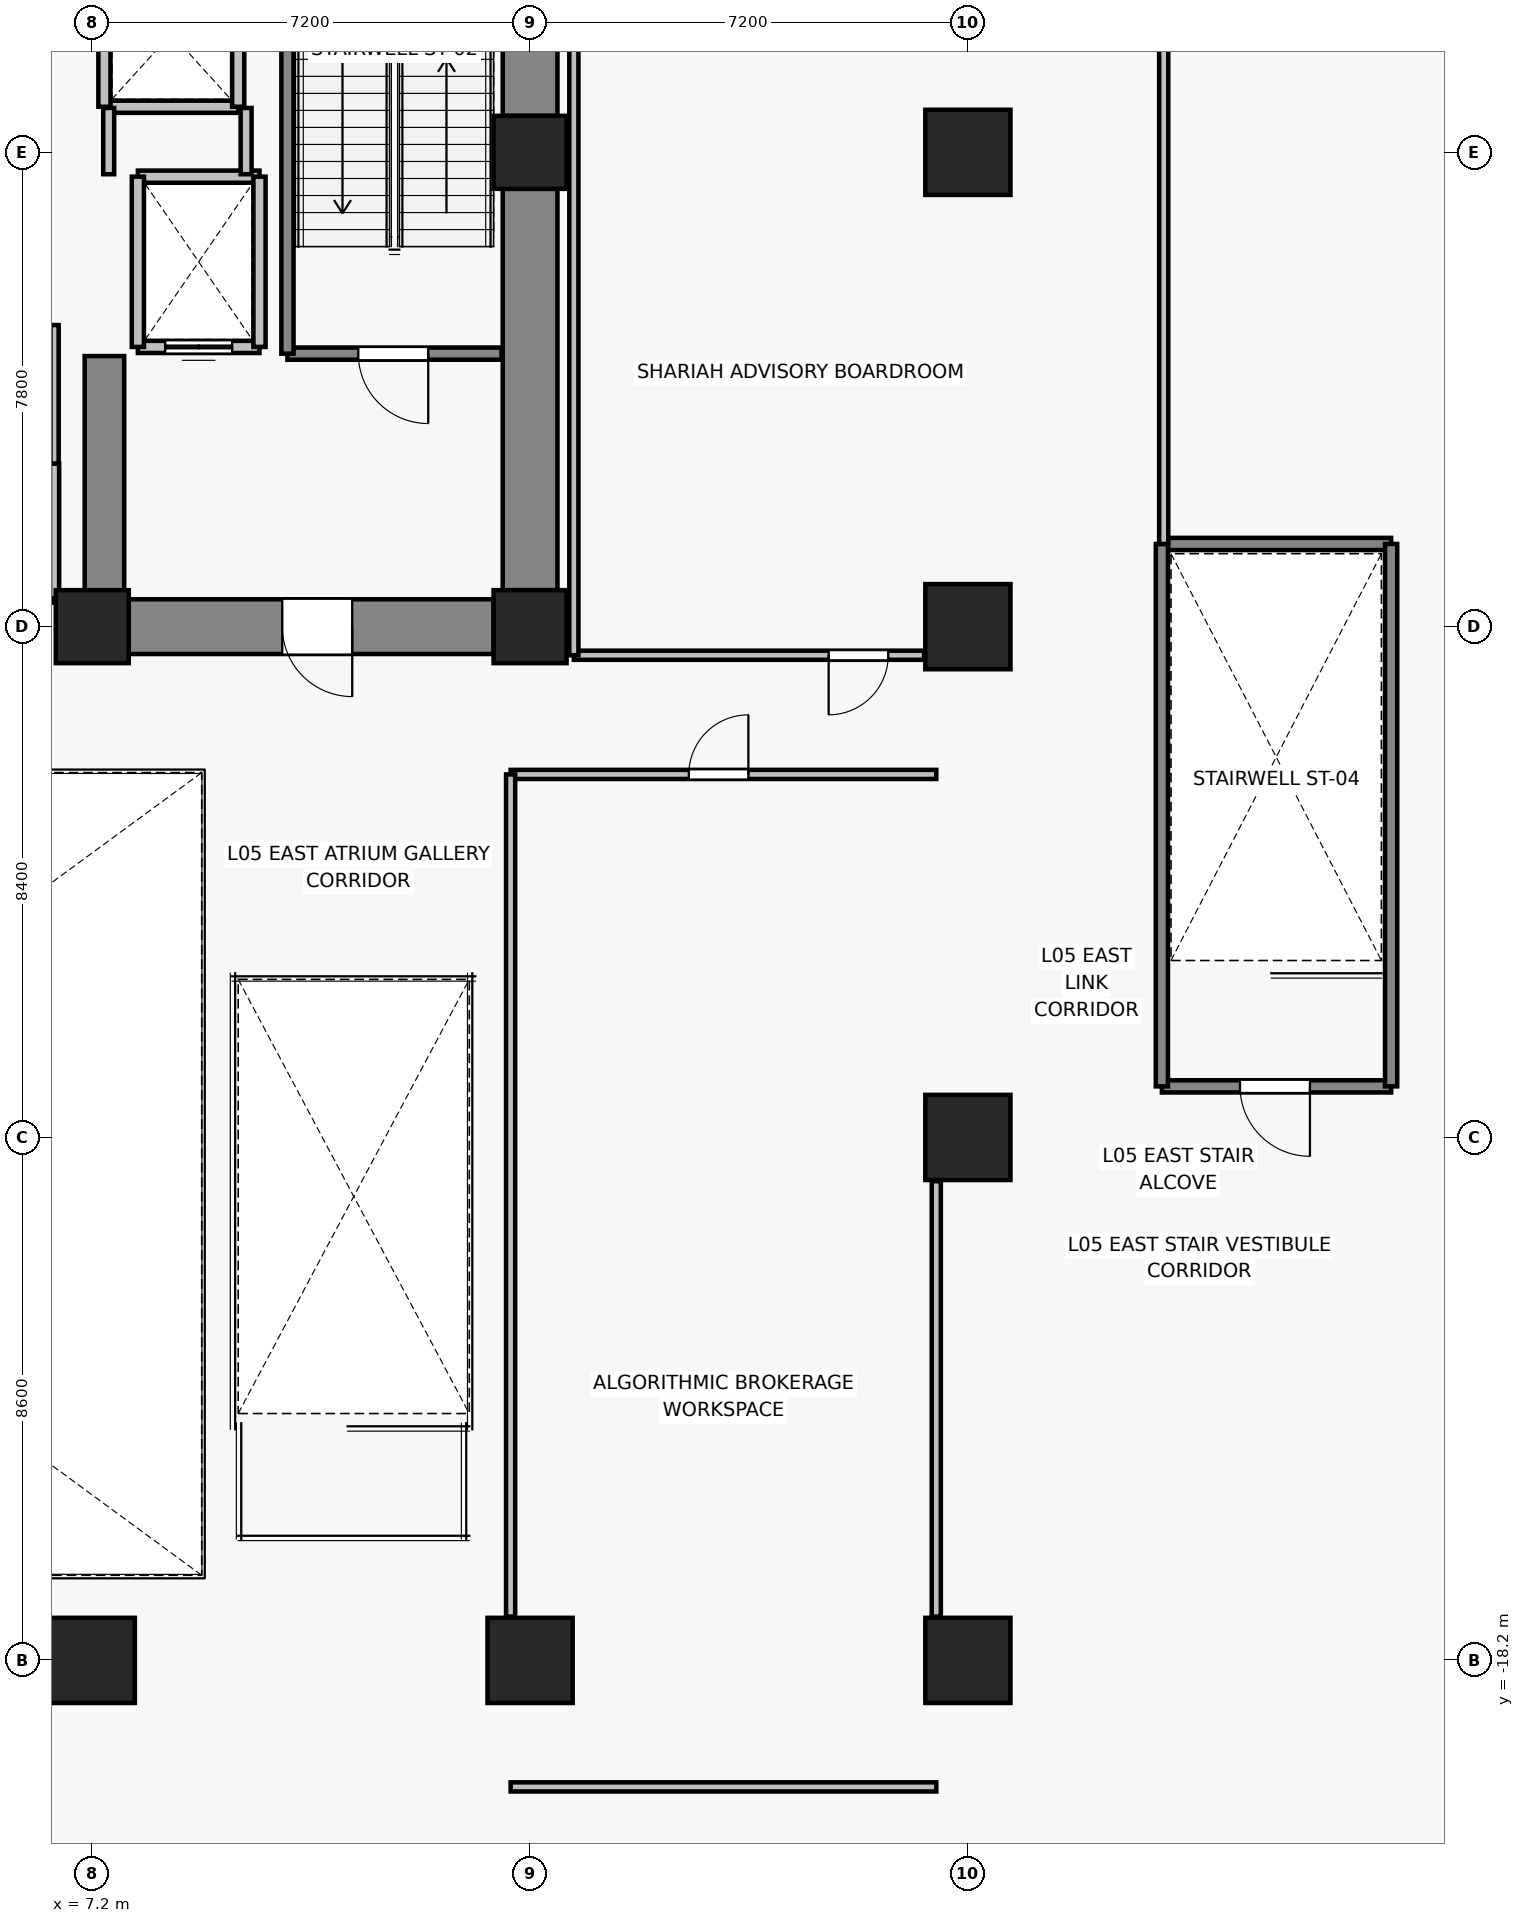
"""IFC4 building model, lengths in metres.
Left out: names, types, materials, properties, quantities, classifications, styles, units other than length and angle.
Written with IfcOpenShell. Run it as: python <this file> out.ifc"""

import sys

from ifc_helpers import new_model, si_unit, direction, frame, frame_2d, origin, origin_2d, place, context, subcontext, project, spatial, rectangle, extrude, source, transform, mapped, element, fill, save


model = new_model("IFC4")
c1 = context("Model", 3, precision=1e-05, world=origin(), true_north=direction((0.0, 1.0)))
c2 = subcontext(c1, "Body", "Model", "MODEL_VIEW")
j1 = project(units=[si_unit("LENGTHUNIT", "METRE"), si_unit("PLANEANGLEUNIT", "RADIAN")], contexts=[c1])
p1 = place(None, origin())
s1 = spatial("IfcSite", under=j1, at=p1, CompositionType="ELEMENT")
p2 = place(p1, origin())
s2 = spatial("IfcBuilding", under=s1, at=p2, CompositionType="ELEMENT")
p3 = place(p2, frame((0.0, 0.0, 22.6)))
s3 = spatial("IfcBuildingStorey", under=s2, at=p3, CompositionType="ELEMENT", Elevation=22.6)
for number, where, z_axis, x_axis in (
    (1, (7.2, -1.2, 0.0), (0.0, 0.0, 1.0), (1.0, 0.0, 0.0)),
    (2, (14.4, -1.2, 0.0), (0.0, 0.0, 1.0), (1.0, 0.0, 0.0)),
    (3, (14.4, 6.6, 0.0), (0.0, 0.0, 1.0), (1.0, 0.0, 0.0)),
):
    element("IfcColumn", number, at=place(p3, frame(where, z_axis=z_axis, x_axis=x_axis)), inside=s3, PredefinedType="COLUMN", context=c2, shape_type="SweptSolid", body=[
        extrude(rectangle(XDim=1.2, YDim=1.2, at=origin_2d()), origin(), (0.0, 0.0, 1.0), 4.8),
    ])
for number, where, z_axis, x_axis in (
    (4, (7.2, -18.2, 0.0), (0.0, 0.0, 1.0), (1.0, 0.0, 0.0)),
    (5, (14.4, -18.2, 0.0), (0.0, 0.0, 1.0), (1.0, 0.0, 0.0)),
    (6, (21.6, -18.2, 0.0), (0.0, 0.0, 1.0), (1.0, 0.0, 0.0)),
    (7, (21.6, -9.6, 0.0), (0.0, 0.0, 1.0), (1.0, 0.0, 0.0)),
    (8, (21.6, -1.2, 0.0), (0.0, 0.0, 1.0), (1.0, 0.0, 0.0)),
    (9, (21.6, 6.6, 0.0), (0.0, 0.0, 1.0), (1.0, 0.0, 0.0)),
):
    element("IfcColumn", number, at=place(p3, frame(where, z_axis=z_axis, x_axis=x_axis)), inside=s3, PredefinedType="COLUMN", context=c2, shape_type="SweptSolid", body=[
        extrude(rectangle(XDim=1.4, YDim=1.4, at=origin_2d()), origin(), (0.0, 0.0, 1.0), 4.8),
    ])
p4 = place(p3, frame((14.4, -0.6, 0.0), z_axis=(0.0, 0.0, 1.0), x_axis=(0.0, 1.0, 0.0)))
e10 = element("IfcWall", 10, at=p4, inside=s3, PredefinedType="SHEAR", context=c2, shape_type="SweptSolid", body=[
    extrude(rectangle(XDim=6.6, YDim=0.9, at=frame_2d((3.3, 0.0))), origin(), (0.0, 0.0, 1.0), 4.55),
])
p5 = place(p3, frame((14.4, 7.2, 0.0), z_axis=(0.0, 0.0, 1.0), x_axis=(0.0, 1.0, 0.0)))
e11 = element("IfcWall", 11, at=p5, inside=s3, PredefinedType="SHEAR", context=c2, shape_type="SweptSolid", body=[
    extrude(rectangle(XDim=5.7, YDim=0.9, at=frame_2d((2.85, 0.0))), origin(), (0.0, 0.0, 1.0), 4.55),
])
p6 = place(p3, frame((13.8, -1.2, 0.0), z_axis=(0.0, 0.0, 1.0), x_axis=(-1.0, 0.0, 0.0)))
e12 = element("IfcWall", 12, at=p6, inside=s3, PredefinedType="SHEAR", context=c2, shape_type="SweptSolid", body=[
    extrude(rectangle(XDim=6.0, YDim=0.9, at=frame_2d((3.0, 0.0))), origin(), (0.0, 0.0, 1.0), 4.55),
])
p7 = place(p6, frame((2.325, 0.0, 0.0)))
e13 = element("IfcOpeningElement", 13, at=p7, cuts=e12, PredefinedType="OPENING", context=c2, shape_type="SweptSolid", body=[
    extrude(rectangle(XDim=1.15, YDim=2.15, at=frame_2d((0.575, 1.075))), frame((0.0, 0.46, 0.0), z_axis=(0.0, -1.0, 0.0), x_axis=(1.0, 0.0, 0.0)), (0.0, 0.0, 1.0), 0.92),
])
p8 = place(p3, frame((7.4, -0.75, 0.0), z_axis=(0.0, 0.0, 1.0), x_axis=(0.0, 1.0, 0.0)))
e14 = element("IfcWall", 14, at=p8, inside=s3, PredefinedType="SHEAR", context=c2, shape_type="SweptSolid", body=[
    extrude(rectangle(XDim=4.0, YDim=0.65, at=frame_2d((2.0, 0.0))), origin(), (0.0, 0.0, 1.0), 4.55),
])
p9 = place(p3, frame((9.95, 3.4, 0.0), z_axis=(0.0, 0.0, 1.0), x_axis=(-1.0, 0.0, 0.0)))
e15 = element("IfcWall", 15, at=p9, inside=s3, PredefinedType="SOLIDWALL", context=c2, shape_type="SweptSolid", body=[
    extrude(rectangle(XDim=2.0, YDim=0.2, at=frame_2d((1.0, 0.0))), origin(), (0.0, 0.0, 1.0), 4.55),
])
p10 = place(p9, frame((0.45, 0.0, 0.0)))
e16 = element("IfcOpeningElement", 16, at=p10, cuts=e15, PredefinedType="OPENING", context=c2, shape_type="SweptSolid", body=[
    extrude(rectangle(XDim=1.1, YDim=2.2, at=frame_2d((0.55, 1.1))), frame((0.0, 0.11, 0.0), z_axis=(0.0, -1.0, 0.0), x_axis=(1.0, 0.0, 0.0)), (0.0, 0.0, 1.0), 0.22),
])
p11 = place(p3, frame((7.95, 6.2, 0.0), z_axis=(0.0, 0.0, 1.0), x_axis=(1.0, 0.0, 0.0)))
e17 = element("IfcWall", 17, at=p11, inside=s3, PredefinedType="SOLIDWALL", context=c2, shape_type="SweptSolid", body=[
    extrude(rectangle(XDim=2.0, YDim=0.2, at=frame_2d((1.0, 0.0))), origin(), (0.0, 0.0, 1.0), 4.55),
])
for number, where, z_axis, x_axis in (
    (18, (7.95, 3.4, 0.0), (0.0, 0.0, 1.0), (0.0, 1.0, 0.0)),
    (19, (9.95, 6.2, 0.0), (0.0, 0.0, 1.0), (0.0, -1.0, 0.0)),
):
    element("IfcWall", number, at=place(p3, frame(where, z_axis=z_axis, x_axis=x_axis)), inside=s3, PredefinedType="SOLIDWALL", context=c2, shape_type="SweptSolid", body=[
        extrude(rectangle(XDim=2.8, YDim=0.2, at=frame_2d((1.4, 0.0))), origin(), (0.0, 0.0, 1.0), 4.55),
    ])
p12 = place(p3, frame((9.6, 7.35, 0.0), z_axis=(0.0, 0.0, 1.0), x_axis=(-1.0, 0.0, 0.0)))
e20 = element("IfcWall", 20, at=p12, inside=s3, PredefinedType="SOLIDWALL", context=c2, shape_type="SweptSolid", body=[
    extrude(rectangle(XDim=2.2, YDim=0.2, at=frame_2d((1.1, 0.0))), origin(), (0.0, 0.0, 1.0), 3.09),
])
p13 = place(p3, frame((7.4, 7.35, 0.0), z_axis=(0.0, 0.0, 1.0), x_axis=(0.0, 1.0, 0.0)))
e21 = element("IfcWall", 21, at=p13, inside=s3, PredefinedType="SOLIDWALL", context=c2, shape_type="SweptSolid", body=[
    extrude(rectangle(XDim=2.4, YDim=0.2, at=frame_2d((1.2, 0.0))), origin(), (0.0, 0.0, 1.0), 3.09),
])
p14 = place(p3, frame((9.6, 9.75, 0.0), z_axis=(0.0, 0.0, 1.0), x_axis=(0.0, -1.0, 0.0)))
e22 = element("IfcWall", 22, at=p14, inside=s3, PredefinedType="SOLIDWALL", context=c2, shape_type="SweptSolid", body=[
    extrude(rectangle(XDim=2.4, YDim=0.2, at=frame_2d((1.2, 0.0))), origin(), (0.0, 0.0, 1.0), 4.55),
])
p15 = place(p3, frame((13.93, 3.29, 0.0), z_axis=(0.0, 0.0, 1.0), x_axis=(-1.0, 0.0, 0.0)))
e23 = element("IfcWall", 23, at=p15, inside=s3, PredefinedType="SOLIDWALL", context=c2, shape_type="SweptSolid", body=[
    extrude(rectangle(XDim=3.52, YDim=0.2, at=frame_2d((1.76, 0.0))), origin(), (0.0, 0.0, 1.0), 4.55),
])
p16 = place(p15, frame((1.205, 0.0, 0.0)))
e24 = element("IfcOpeningElement", 24, at=p16, cuts=e23, PredefinedType="OPENING", context=c2, shape_type="SweptSolid", body=[
    extrude(rectangle(XDim=1.15, YDim=2.15, at=frame_2d((0.575, 1.075))), frame((0.0, 0.11, 0.0), z_axis=(0.0, -1.0, 0.0), x_axis=(1.0, 0.0, 0.0)), (0.0, 0.0, 1.0), 0.22),
])
p17 = place(p3, frame((10.41, 3.29, 0.0), z_axis=(0.0, 0.0, 1.0), x_axis=(0.0, 1.0, 0.0)))
e25 = element("IfcWall", 25, at=p17, inside=s3, PredefinedType="SOLIDWALL", context=c2, shape_type="SweptSolid", body=[
    extrude(rectangle(XDim=8.84, YDim=0.2, at=frame_2d((4.42, 0.0))), origin(), (0.0, 0.0, 1.0), 4.55),
])
p18 = place(p3, frame((7.47, 6.24, 0.0), z_axis=(0.0, 0.0, 1.0), x_axis=(0.0, 1.0, 0.0)))
e26 = element("IfcWall", 26, at=p18, inside=s3, PredefinedType="PARTITIONING", context=c2, shape_type="SweptSolid", body=[
    extrude(rectangle(XDim=1.09, YDim=0.18, at=frame_2d((0.545, 0.0))), origin(), (0.0, 0.0, 1.0), 3.09),
])
p19 = place(p3, frame((9.73, 7.33, 0.0), z_axis=(0.0, 0.0, 1.0), x_axis=(0.0, -1.0, 0.0)))
e27 = element("IfcWall", 27, at=p19, inside=s3, PredefinedType="PARTITIONING", context=c2, shape_type="SweptSolid", body=[
    extrude(rectangle(XDim=1.09, YDim=0.18, at=frame_2d((0.545, 0.0))), origin(), (0.0, 0.0, 1.0), 4.55),
])
p20 = place(p3, frame((6.58, 1.48, 0.0), z_axis=(0.0, 0.0, 1.0), x_axis=(-1.0, 0.0, 0.0)))
e28 = element("IfcWall", 28, at=p20, inside=s3, PredefinedType="PARTITIONING", context=c2, shape_type="SweptSolid", body=[
    extrude(rectangle(XDim=5.11, YDim=0.135, at=frame_2d((2.555, 0.0))), origin(), (0.0, 0.0, 1.0), 4.55),
])
p21 = place(p3, frame((6.58, 3.76, 0.0), z_axis=(0.0, 0.0, 1.0), x_axis=(0.0, -1.0, 0.0)))
e29 = element("IfcWall", 29, at=p21, inside=s3, PredefinedType="PARTITIONING", context=c2, shape_type="SweptSolid", body=[
    extrude(rectangle(XDim=2.28, YDim=0.135, at=frame_2d((1.14, 0.0))), origin(), (0.0, 0.0, 1.0), 4.55),
])
p22 = place(p3, frame((6.58, -0.73, 0.0), z_axis=(0.0, 0.0, 1.0), x_axis=(-1.0, 0.0, 0.0)))
e30 = element("IfcWall", 30, at=p22, inside=s3, PredefinedType="PARTITIONING", context=c2, shape_type="SweptSolid", body=[
    extrude(rectangle(XDim=2.4, YDim=0.15, at=frame_2d((1.2, 0.0))), origin(), (0.0, 0.0, 1.0), 4.55),
])
p23 = place(p22, frame((0.76, 0.0, 0.0)))
e31 = element("IfcOpeningElement", 31, at=p23, cuts=e30, PredefinedType="OPENING", context=c2, shape_type="SweptSolid", body=[
    extrude(rectangle(XDim=0.88, YDim=2.1, at=frame_2d((0.44, 1.05))), frame((0.0, 0.085, 0.0), z_axis=(0.0, -1.0, 0.0), x_axis=(1.0, 0.0, 0.0)), (0.0, 0.0, 1.0), 0.17),
])
p24 = place(p3, frame((6.58, 1.48, 0.0), z_axis=(0.0, 0.0, 1.0), x_axis=(0.0, -1.0, 0.0)))
e32 = element("IfcWall", 32, at=p24, inside=s3, PredefinedType="PARTITIONING", context=c2, shape_type="SweptSolid", body=[
    extrude(rectangle(XDim=2.21, YDim=0.15, at=frame_2d((1.105, 0.0))), origin(), (0.0, 0.0, 1.0), 4.55),
])
p25 = place(p3, frame((28.56, -8.76, 0.0), z_axis=(0.0, 0.0, 1.0), x_axis=(-1.0, 0.0, 0.0)))
e33 = element("IfcWall", 33, at=p25, inside=s3, PredefinedType="SOLIDWALL", context=c2, shape_type="SweptSolid", body=[
    extrude(rectangle(XDim=3.77, YDim=0.2, at=frame_2d((1.885, 0.0))), origin(), (0.0, 0.0, 1.0), 3.09),
])
p26 = place(p25, frame((1.335, 0.0, 0.0)))
e34 = element("IfcOpeningElement", 34, at=p26, cuts=e33, PredefinedType="OPENING", context=c2, shape_type="SweptSolid", body=[
    extrude(rectangle(XDim=1.15, YDim=2.15, at=frame_2d((0.575, 1.075))), frame((0.0, 0.11, 0.0), z_axis=(0.0, -1.0, 0.0), x_axis=(1.0, 0.0, 0.0)), (0.0, 0.0, 1.0), 0.22),
])
p27 = place(p3, frame((24.79, 0.16, 0.0), z_axis=(0.0, 0.0, 1.0), x_axis=(1.0, 0.0, 0.0)))
e35 = element("IfcWall", 35, at=p27, inside=s3, PredefinedType="SOLIDWALL", context=c2, shape_type="SweptSolid", body=[
    extrude(rectangle(XDim=3.77, YDim=0.2, at=frame_2d((1.885, 0.0))), origin(), (0.0, 0.0, 1.0), 3.09),
])
for number, where, z_axis, x_axis in (
    (36, (24.79, -8.76, 0.0), (0.0, 0.0, 1.0), (0.0, 1.0, 0.0)),
    (37, (28.56, 0.16, 0.0), (0.0, 0.0, 1.0), (0.0, -1.0, 0.0)),
):
    element("IfcWall", number, at=place(p3, frame(where, z_axis=z_axis, x_axis=x_axis)), inside=s3, PredefinedType="SOLIDWALL", context=c2, shape_type="SweptSolid", body=[
        extrude(rectangle(XDim=8.92, YDim=0.2, at=frame_2d((4.46, 0.0))), origin(), (0.0, 0.0, 1.0), 3.09),
    ])
p28 = place(p3, frame((21.08, -20.28, 0.0), z_axis=(0.0, 0.0, 1.0), x_axis=(-1.0, 0.0, 0.0)))
e38 = element("IfcWall", 38, at=p28, inside=s3, PredefinedType="PARTITIONING", context=c2, shape_type="SweptSolid", body=[
    extrude(rectangle(XDim=7.0, YDim=0.15, at=frame_2d((3.5, 0.0))), origin(), (0.0, 0.0, 1.0), 4.14),
])
p29 = place(p3, frame((14.08, -3.63, 0.0), z_axis=(0.0, 0.0, 1.0), x_axis=(1.0, 0.0, 0.0)))
e39 = element("IfcWall", 39, at=p29, inside=s3, PredefinedType="PARTITIONING", context=c2, shape_type="SweptSolid", body=[
    extrude(rectangle(XDim=7.0, YDim=0.15, at=frame_2d((3.5, 0.0))), origin(), (0.0, 0.0, 1.0), 3.09),
])
p30 = place(p29, frame((2.93, 0.0, 0.0)))
e40 = element("IfcOpeningElement", 40, at=p30, cuts=e39, PredefinedType="OPENING", context=c2, shape_type="SweptSolid", body=[
    extrude(rectangle(XDim=0.98, YDim=2.15, at=frame_2d((0.49, 1.075))), frame((0.0, 0.085, 0.0), z_axis=(0.0, -1.0, 0.0), x_axis=(1.0, 0.0, 0.0)), (0.0, 0.0, 1.0), 0.17),
])
p31 = place(p3, frame((14.08, -17.48, 0.0), z_axis=(0.0, 0.0, 1.0), x_axis=(0.0, 1.0, 0.0)))
e41 = element("IfcWall", 41, at=p31, inside=s3, PredefinedType="PARTITIONING", context=c2, shape_type="SweptSolid", body=[
    extrude(rectangle(XDim=13.85, YDim=0.15, at=frame_2d((6.925, 0.0))), origin(), (0.0, 0.0, 1.0), 3.09),
])
p32 = place(p3, frame((21.08, -10.32, 0.0), z_axis=(0.0, 0.0, 1.0), x_axis=(0.0, -1.0, 0.0)))
e42 = element("IfcWall", 42, at=p32, inside=s3, PredefinedType="PARTITIONING", context=c2, shape_type="SweptSolid", body=[
    extrude(rectangle(XDim=7.16, YDim=0.15, at=frame_2d((3.58, 0.0))), origin(), (0.0, 0.0, 1.0), 3.94),
])
p33 = place(p3, frame((20.88, -1.67, 0.0), z_axis=(0.0, 0.0, 1.0), x_axis=(-1.0, 0.0, 0.0)))
e43 = element("IfcWall", 43, at=p33, inside=s3, PredefinedType="PARTITIONING", context=c2, shape_type="SweptSolid", body=[
    extrude(rectangle(XDim=5.76, YDim=0.15, at=frame_2d((2.88, 0.0))), origin(), (0.0, 0.0, 1.0), 4.55),
])
p34 = place(p33, frame((0.59, 0.0, 0.0)))
e44 = element("IfcOpeningElement", 44, at=p34, cuts=e43, PredefinedType="OPENING", context=c2, shape_type="SweptSolid", body=[
    extrude(rectangle(XDim=0.98, YDim=2.15, at=frame_2d((0.49, 1.075))), frame((0.0, 0.085, 0.0), z_axis=(0.0, -1.0, 0.0), x_axis=(1.0, 0.0, 0.0)), (0.0, 0.0, 1.0), 0.17),
])
p35 = place(p3, frame((15.12, -1.67, 0.0), z_axis=(0.0, 0.0, 1.0), x_axis=(0.0, 1.0, 0.0)))
e45 = element("IfcWall", 45, at=p35, inside=s3, PredefinedType="PARTITIONING", context=c2, shape_type="SweptSolid", body=[
    extrude(rectangle(XDim=15.15, YDim=0.15, at=frame_2d((7.575, 0.0))), origin(), (0.0, 0.0, 1.0), 3.726),
])
p36 = place(p3, frame((24.82, 13.48, 0.0), z_axis=(0.0, 0.0, 1.0), x_axis=(0.0, -1.0, 0.0)))
e46 = element("IfcWall", 46, at=p36, inside=s3, PredefinedType="PARTITIONING", context=c2, shape_type="SweptSolid", body=[
    extrude(rectangle(XDim=13.32, YDim=0.15, at=frame_2d((6.66, 0.0))), origin(), (0.0, 0.0, 1.0), 3.09),
])
m1 = source(origin(), c2, "Body", "SweptSolid", [
    extrude(rectangle(XDim=1.1, YDim=2.2, at=frame_2d((0.55, 1.1))), frame((0.0, 0.025, 0.0), z_axis=(0.0, -1.0, 0.0), x_axis=(1.0, 0.0, 0.0)), (0.0, 0.0, 1.0), 0.05),
])
p37 = place(p10, origin())
e47 = element("IfcDoor", 47, at=p37, inside=s3, OperationType="DOUBLE_DOOR_SLIDING", PredefinedType="DOOR", context=c2, shape_type="MappedRepresentation", body=[
    mapped(m1, transform((0.0, 0.0, 0.0), x_axis=(1.0, 0.0, 0.0), y_axis=(0.0, 1.0, 0.0), z_axis=(0.0, 0.0, 1.0), scale=1.0)),
])
fill(e16, e47)
m2 = source(origin(), c2, "Body", "SweptSolid", [
    extrude(rectangle(XDim=1.15, YDim=2.15, at=frame_2d((0.575, 1.075))), frame((0.0, 0.025, 0.0), z_axis=(0.0, -1.0, 0.0), x_axis=(1.0, 0.0, 0.0)), (0.0, 0.0, 1.0), 0.05),
])
p38 = place(p16, origin())
e48 = element("IfcDoor", 48, at=p38, inside=s3, OperationType="SINGLE_SWING_LEFT", PredefinedType="DOOR", context=c2, shape_type="MappedRepresentation", body=[
    mapped(m2, transform((0.0, 0.0, 0.0), x_axis=(1.0, 0.0, 0.0), y_axis=(0.0, 1.0, 0.0), z_axis=(0.0, 0.0, 1.0), scale=1.0)),
])
fill(e24, e48)
p39 = place(p7, origin())
e49 = element("IfcDoor", 49, at=p39, inside=s3, OperationType="SINGLE_SWING_LEFT", PredefinedType="DOOR", context=c2, shape_type="MappedRepresentation", body=[
    mapped(m2, transform((0.0, 0.0, 0.0), x_axis=(1.0, 0.0, 0.0), y_axis=(0.0, 1.0, 0.0), z_axis=(0.0, 0.0, 1.0), scale=1.0)),
])
fill(e13, e49)
p40 = place(p26, origin())
e50 = element("IfcDoor", 50, at=p40, inside=s3, OperationType="SINGLE_SWING_LEFT", PredefinedType="DOOR", context=c2, shape_type="MappedRepresentation", body=[
    mapped(m2, transform((0.0, 0.0, 0.0), x_axis=(1.0, 0.0, 0.0), y_axis=(0.0, 1.0, 0.0), z_axis=(0.0, 0.0, 1.0), scale=1.0)),
])
fill(e34, e50)
m3 = source(origin(), c2, "Body", "SweptSolid", [
    extrude(rectangle(XDim=0.98, YDim=2.15, at=frame_2d((0.49, 1.075))), frame((0.0, 0.025, 0.0), z_axis=(0.0, -1.0, 0.0), x_axis=(1.0, 0.0, 0.0)), (0.0, 0.0, 1.0), 0.05),
])
p41 = place(p30, origin())
e51 = element("IfcDoor", 51, at=p41, inside=s3, OperationType="SINGLE_SWING_RIGHT", PredefinedType="DOOR", context=c2, shape_type="MappedRepresentation", body=[
    mapped(m3, transform((0.0, 0.0, 0.0), x_axis=(1.0, 0.0, 0.0), y_axis=(0.0, 1.0, 0.0), z_axis=(0.0, 0.0, 1.0), scale=1.0)),
])
fill(e40, e51)
p42 = place(p34, origin())
e52 = element("IfcDoor", 52, at=p42, inside=s3, OperationType="SINGLE_SWING_RIGHT", PredefinedType="DOOR", context=c2, shape_type="MappedRepresentation", body=[
    mapped(m3, transform((0.0, 0.0, 0.0), x_axis=(1.0, 0.0, 0.0), y_axis=(0.0, 1.0, 0.0), z_axis=(0.0, 0.0, 1.0), scale=1.0)),
])
fill(e44, e52)
save(model, sys.argv[1])
